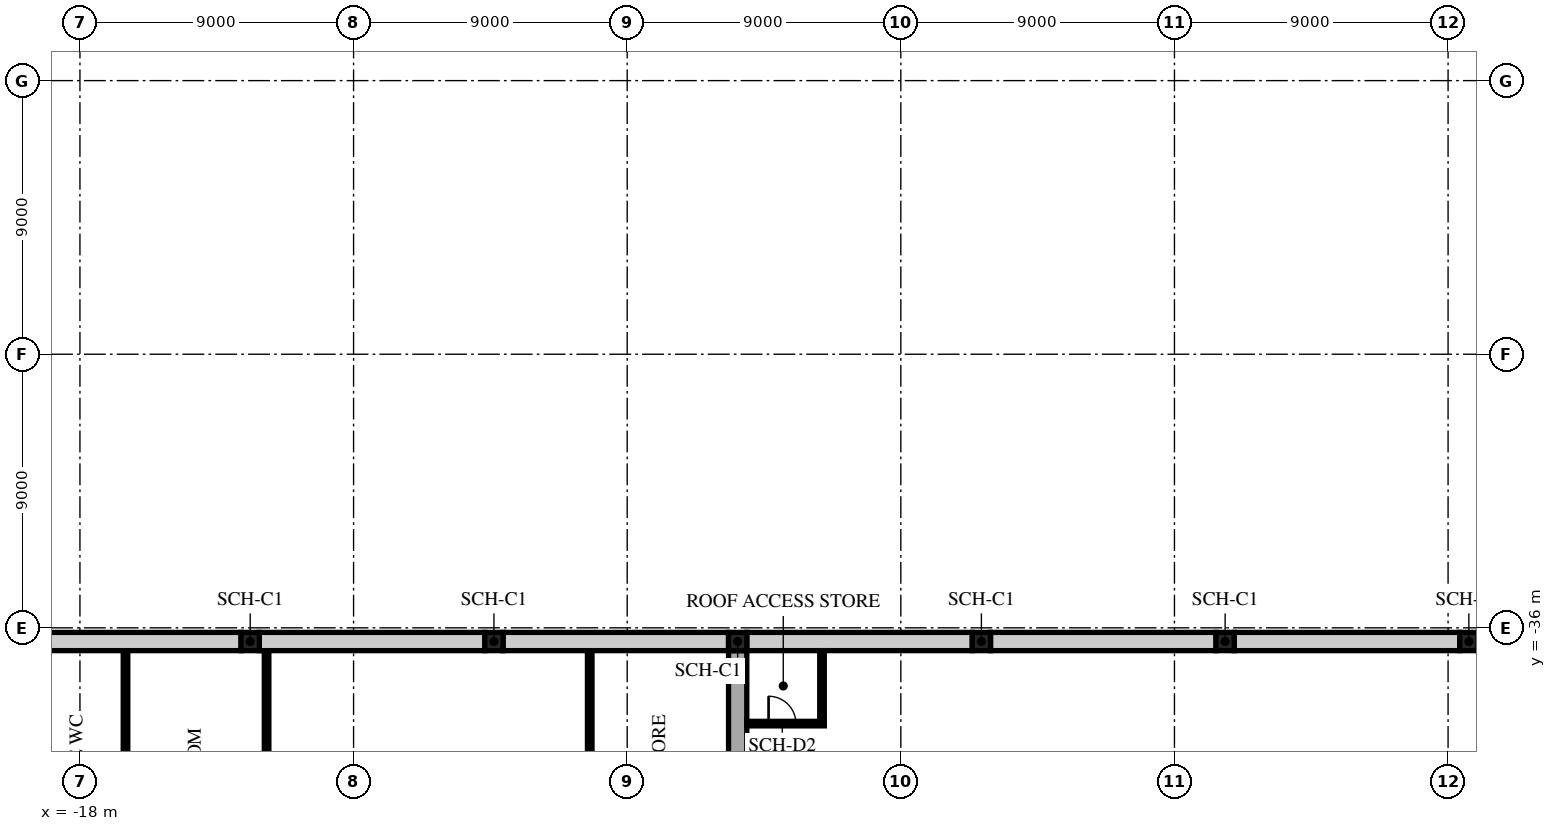
"""IFC4 building model, lengths in metres.
Left out: names, types, materials, properties, quantities, classifications, styles, units other than length and angle.
Written with IfcOpenShell. Run it as: python <this file> out.ifc"""

import sys

from ifc_helpers import new_model, si_unit, direction, frame, frame_2d, origin, origin_2d, place, context, subcontext, project, spatial, rectangle, extrude, element, fill, save


model = new_model("IFC4")
c1 = context("Model", 3, precision=1e-05, world=origin(), true_north=direction((0.0, 1.0)))
c2 = subcontext(c1, "Body", "Model", "MODEL_VIEW")
j1 = project(units=[si_unit("LENGTHUNIT", "METRE"), si_unit("PLANEANGLEUNIT", "RADIAN")], contexts=[c1])
p1 = place(None, origin())
s1 = spatial("IfcSite", under=j1, at=p1, CompositionType="ELEMENT")
p2 = place(p1, origin())
s2 = spatial("IfcBuilding", under=s1, at=p2, CompositionType="ELEMENT")
p3 = place(p2, origin())
s3 = spatial("IfcBuildingStorey", under=s2, at=p3, CompositionType="ELEMENT", Elevation=0.0)
p4 = place(p3, frame((-18.0, -34.6, 0.0), z_axis=(0.0, 0.0, 1.0), x_axis=(1.0, 0.0, 0.0)))
e1 = element("IfcColumn", 1, at=p4, inside=s3, PredefinedType="COLUMN", context=c2, shape_type="SweptSolid", body=[
    extrude(rectangle(XDim=0.7, YDim=0.7, at=origin_2d()), origin(), (0.0, 0.0, 1.0), 4.5),
])
p5 = place(p3, frame((-18.0, -27.0, 0.0), z_axis=(0.0, 0.0, 1.0), x_axis=(1.0, 0.0, 0.0)))
e2 = element("IfcColumn", 2, at=p5, inside=s3, PredefinedType="COLUMN", context=c2, shape_type="SweptSolid", body=[
    extrude(rectangle(XDim=0.85, YDim=0.85, at=origin_2d()), origin(), (0.0, 0.0, 1.0), 4.5),
])
p6 = place(p3, frame((-18.0, -18.0, 0.0), z_axis=(0.0, 0.0, 1.0), x_axis=(1.0, 0.0, 0.0)))
e3 = element("IfcColumn", 3, at=p6, inside=s3, PredefinedType="COLUMN", context=c2, shape_type="SweptSolid", body=[
    extrude(rectangle(XDim=0.875, YDim=0.875, at=origin_2d()), origin(), (0.0, 0.0, 1.0), 4.5),
])
p7 = place(p3, frame((-9.0, -34.6, 0.0), z_axis=(0.0, 0.0, 1.0), x_axis=(1.0, 0.0, 0.0)))
e4 = element("IfcColumn", 4, at=p7, inside=s3, PredefinedType="COLUMN", context=c2, shape_type="SweptSolid", body=[
    extrude(rectangle(XDim=0.725, YDim=0.725, at=origin_2d()), origin(), (0.0, 0.0, 1.0), 4.5),
])
p8 = place(p3, frame((-9.0, -18.0, 0.0), z_axis=(0.0, 0.0, 1.0), x_axis=(1.0, 0.0, 0.0)))
e5 = element("IfcColumn", 5, at=p8, inside=s3, PredefinedType="COLUMN", context=c2, shape_type="SweptSolid", body=[
    extrude(rectangle(XDim=0.825, YDim=0.825, at=origin_2d()), origin(), (0.0, 0.0, 1.0), 4.5),
])
p9 = place(p3, frame((0.0, -34.6, 0.0), z_axis=(0.0, 0.0, 1.0), x_axis=(1.0, 0.0, 0.0)))
e6 = element("IfcColumn", 6, at=p9, inside=s3, PredefinedType="COLUMN", context=c2, shape_type="SweptSolid", body=[
    extrude(rectangle(XDim=0.7, YDim=0.7, at=origin_2d()), origin(), (0.0, 0.0, 1.0), 4.5),
])
for number, where, z_axis, x_axis in (
    (7, (0.0, -27.0, 0.0), (0.0, 0.0, 1.0), (1.0, 0.0, 0.0)),
    (8, (0.0, -18.0, 0.0), (0.0, 0.0, 1.0), (1.0, 0.0, 0.0)),
):
    element("IfcColumn", number, at=place(p3, frame(where, z_axis=z_axis, x_axis=x_axis)), inside=s3, PredefinedType="COLUMN", context=c2, shape_type="SweptSolid", body=[
        extrude(rectangle(XDim=0.8, YDim=0.8, at=origin_2d()), origin(), (0.0, 0.0, 1.0), 4.5),
    ])
p10 = place(p3, frame((9.0, -34.6, 0.0), z_axis=(0.0, 0.0, 1.0), x_axis=(1.0, 0.0, 0.0)))
e9 = element("IfcColumn", 9, at=p10, inside=s3, PredefinedType="COLUMN", context=c2, shape_type="SweptSolid", body=[
    extrude(rectangle(XDim=0.675, YDim=0.675, at=origin_2d()), origin(), (0.0, 0.0, 1.0), 4.5),
])
p11 = place(p3, frame((9.0, -27.0, 0.0), z_axis=(0.0, 0.0, 1.0), x_axis=(1.0, 0.0, 0.0)))
e10 = element("IfcColumn", 10, at=p11, inside=s3, PredefinedType="COLUMN", context=c2, shape_type="SweptSolid", body=[
    extrude(rectangle(XDim=0.825, YDim=0.825, at=origin_2d()), origin(), (0.0, 0.0, 1.0), 4.5),
])
p12 = place(p3, frame((9.0, -18.0, 0.0), z_axis=(0.0, 0.0, 1.0), x_axis=(1.0, 0.0, 0.0)))
e11 = element("IfcColumn", 11, at=p12, inside=s3, PredefinedType="COLUMN", context=c2, shape_type="SweptSolid", body=[
    extrude(rectangle(XDim=0.775, YDim=0.775, at=origin_2d()), origin(), (0.0, 0.0, 1.0), 4.5),
])
p13 = place(p3, frame((18.0, -34.6, 0.0), z_axis=(0.0, 0.0, 1.0), x_axis=(1.0, 0.0, 0.0)))
e12 = element("IfcColumn", 12, at=p13, inside=s3, PredefinedType="COLUMN", context=c2, shape_type="SweptSolid", body=[
    extrude(rectangle(XDim=0.725, YDim=0.725, at=origin_2d()), origin(), (0.0, 0.0, 1.0), 4.5),
])
p14 = place(p3, frame((18.0, -18.0, 0.0), z_axis=(0.0, 0.0, 1.0), x_axis=(1.0, 0.0, 0.0)))
e13 = element("IfcColumn", 13, at=p14, inside=s3, PredefinedType="COLUMN", context=c2, shape_type="SweptSolid", body=[
    extrude(rectangle(XDim=0.875, YDim=0.875, at=origin_2d()), origin(), (0.0, 0.0, 1.0), 4.5),
])
p15 = place(p3, frame((27.0, -34.6, 0.0), z_axis=(0.0, 0.0, 1.0), x_axis=(1.0, 0.0, 0.0)))
e14 = element("IfcColumn", 14, at=p15, inside=s3, PredefinedType="COLUMN", context=c2, shape_type="SweptSolid", body=[
    extrude(rectangle(XDim=0.625, YDim=0.625, at=origin_2d()), origin(), (0.0, 0.0, 1.0), 4.5),
])
p16 = place(p3, frame((27.0, -27.0, 0.0), z_axis=(0.0, 0.0, 1.0), x_axis=(1.0, 0.0, 0.0)))
e15 = element("IfcColumn", 15, at=p16, inside=s3, PredefinedType="COLUMN", context=c2, shape_type="SweptSolid", body=[
    extrude(rectangle(XDim=0.875, YDim=0.875, at=origin_2d()), origin(), (0.0, 0.0, 1.0), 4.5),
])
p17 = place(p3, frame((27.0, -18.0, 0.0), z_axis=(0.0, 0.0, 1.0), x_axis=(1.0, 0.0, 0.0)))
e16 = element("IfcColumn", 16, at=p17, inside=s3, PredefinedType="COLUMN", context=c2, shape_type="SweptSolid", body=[
    extrude(rectangle(XDim=0.85, YDim=0.85, at=origin_2d()), origin(), (0.0, 0.0, 1.0), 4.5),
])
p18 = place(p3, frame((-9.945, -29.093, 0.0), z_axis=(0.0, 0.0, 1.0), x_axis=(0.991001197216, 0.133853005627, 0.0)))
e17 = element("IfcColumn", 17, at=p18, inside=s3, PredefinedType="COLUMN", context=c2, shape_type="SweptSolid", body=[
    extrude(rectangle(XDim=1.475, YDim=1.475, at=origin_2d()), origin(), (0.0, 0.0, 1.0), 4.5),
])
p19 = place(p3, frame((3.681, -27.253, 0.0), z_axis=(0.0, 0.0, 1.0), x_axis=(0.991001197216, 0.133853005627, 0.0)))
e18 = element("IfcColumn", 18, at=p19, inside=s3, PredefinedType="COLUMN", context=c2, shape_type="SweptSolid", body=[
    extrude(rectangle(XDim=1.6, YDim=1.6, at=origin_2d()), origin(), (0.0, 0.0, 1.0), 4.5),
])
p20 = place(p3, frame((17.307, -25.412, 0.0), z_axis=(0.0, 0.0, 1.0), x_axis=(0.991001197216, 0.133853005627, 0.0)))
e19 = element("IfcColumn", 19, at=p20, inside=s3, PredefinedType="COLUMN", context=c2, shape_type="SweptSolid", body=[
    extrude(rectangle(XDim=1.575, YDim=1.575, at=origin_2d()), origin(), (0.0, 0.0, 1.0), 4.5),
])
p21 = place(p3, frame((27.531, -20.979, 0.0), z_axis=(0.0, 0.0, 1.0), x_axis=(0.991001197216, 0.133853005627, 0.0)))
e20 = element("IfcColumn", 20, at=p21, inside=s3, PredefinedType="COLUMN", context=c2, shape_type="SweptSolid", body=[
    extrude(rectangle(XDim=2.3, YDim=2.3, at=origin_2d()), origin(), (0.0, 0.0, 1.0), 4.5),
])
p22 = place(p3, frame((17.925, -27.0, 0.0), z_axis=(0.0, 0.0, 1.0), x_axis=(1.0, 0.0, 0.0)))
e21 = element("IfcWall", 21, at=p22, inside=s3, PredefinedType="PARTITIONING", context=c2, shape_type="SweptSolid", body=[
    extrude(rectangle(XDim=8.575, YDim=0.15, at=frame_2d((4.288, 0.0))), origin(), (0.0, 0.0, 1.0), 4.1),
])
p23 = place(p22, frame((4.075, 0.0, 0.0)))
e22 = element("IfcOpeningElement", 22, at=p23, cuts=e21, PredefinedType="OPENING", context=c2, shape_type="SweptSolid", body=[
    extrude(rectangle(XDim=1.0, YDim=2.1, at=frame_2d((0.5, 1.05))), frame((0.0, 0.085, 0.0), z_axis=(0.0, -1.0, 0.0), x_axis=(1.0, 0.0, 0.0)), (0.0, 0.0, 1.0), 0.17),
])
p24 = place(p3, frame((27.5, -27.0, 0.0), z_axis=(0.0, 0.0, 1.0), x_axis=(1.0, 0.0, 0.0)))
e23 = element("IfcWall", 23, at=p24, inside=s3, PredefinedType="PARTITIONING", context=c2, shape_type="SweptSolid", body=[
    extrude(rectangle(XDim=6.6, YDim=0.1, at=frame_2d((3.3, 0.0))), origin(), (0.0, 0.0, 1.0), 4.1),
])
p25 = place(p3, frame((-24.681, -18.0, 0.0), z_axis=(0.0, 0.0, 1.0), x_axis=(1.0, 0.0, 0.0)))
e24 = element("IfcWall", 24, at=p25, inside=s3, PredefinedType="PARTITIONING", context=c2, shape_type="SweptSolid", body=[
    extrude(rectangle(XDim=6.181, YDim=0.15, at=frame_2d((3.09, 0.0))), origin(), (0.0, 0.0, 1.0), 4.1),
])
p26 = place(p3, frame((-17.5, -18.0, 0.0), z_axis=(0.0, 0.0, 1.0), x_axis=(1.0, 0.0, 0.0)))
e25 = element("IfcWall", 25, at=p26, inside=s3, PredefinedType="PARTITIONING", context=c2, shape_type="SweptSolid", body=[
    extrude(rectangle(XDim=8.0, YDim=0.15, at=frame_2d((4.0, 0.0))), origin(), (0.0, 0.0, 1.0), 4.1),
])
p27 = place(p26, frame((1.2, 0.0, 0.0)))
e26 = element("IfcOpeningElement", 26, at=p27, cuts=e25, PredefinedType="OPENING", context=c2, shape_type="SweptSolid", body=[
    extrude(rectangle(XDim=1.0, YDim=2.1, at=frame_2d((0.5, 1.05))), frame((0.0, 0.085, 0.0), z_axis=(0.0, -1.0, 0.0), x_axis=(1.0, 0.0, 0.0)), (0.0, 0.0, 1.0), 0.17),
])
p28 = place(p3, frame((-8.5, -18.0, 0.0), z_axis=(0.0, 0.0, 1.0), x_axis=(1.0, 0.0, 0.0)))
e27 = element("IfcWall", 27, at=p28, inside=s3, PredefinedType="PARTITIONING", context=c2, shape_type="SweptSolid", body=[
    extrude(rectangle(XDim=8.0, YDim=0.15, at=frame_2d((4.0, 0.0))), origin(), (0.0, 0.0, 1.0), 4.1),
])
p29 = place(p28, frame((5.2, 0.0, 0.0)))
e28 = element("IfcOpeningElement", 28, at=p29, cuts=e27, PredefinedType="OPENING", context=c2, shape_type="SweptSolid", body=[
    extrude(rectangle(XDim=2.4, YDim=2.1, at=frame_2d((1.2, 1.05))), frame((0.0, 0.085, 0.0), z_axis=(0.0, -1.0, 0.0), x_axis=(1.0, 0.0, 0.0)), (0.0, 0.0, 1.0), 0.17),
])
for number, where, z_axis, x_axis in (
    (29, (0.5, -18.0, 0.0), (0.0, 0.0, 1.0), (1.0, 0.0, 0.0)),
    (30, (9.5, -18.0, 0.0), (0.0, 0.0, 1.0), (1.0, 0.0, 0.0)),
):
    element("IfcWall", number, at=place(p3, frame(where, z_axis=z_axis, x_axis=x_axis)), inside=s3, PredefinedType="PARTITIONING", context=c2, shape_type="SweptSolid", body=[
        extrude(rectangle(XDim=8.0, YDim=0.15, at=frame_2d((4.0, 0.0))), origin(), (0.0, 0.0, 1.0), 4.1),
    ])
p30 = place(p3, frame((27.5, -18.0, 0.0), z_axis=(0.0, 0.0, 1.0), x_axis=(1.0, 0.0, 0.0)))
e31 = element("IfcWall", 31, at=p30, inside=s3, PredefinedType="PARTITIONING", context=c2, shape_type="SweptSolid", body=[
    extrude(rectangle(XDim=6.6, YDim=0.15, at=frame_2d((3.3, 0.0))), origin(), (0.0, 0.0, 1.0), 4.1),
])
p31 = place(p30, frame((3.5, 0.0, 0.0)))
e32 = element("IfcOpeningElement", 32, at=p31, cuts=e31, PredefinedType="OPENING", context=c2, shape_type="SweptSolid", body=[
    extrude(rectangle(XDim=1.0, YDim=2.1, at=frame_2d((0.5, 1.05))), frame((0.0, 0.085, 0.0), z_axis=(0.0, -1.0, 0.0), x_axis=(1.0, 0.0, 0.0)), (0.0, 0.0, 1.0), 0.17),
])
p32 = place(p3, frame((-18.0, -36.0, 0.0), z_axis=(0.0, 0.0, 1.0), x_axis=(0.0, 1.0, 0.0)))
e33 = element("IfcWall", 33, at=p32, inside=s3, PredefinedType="PARTITIONING", context=c2, shape_type="SweptSolid", body=[
    extrude(rectangle(XDim=0.9, YDim=0.1, at=frame_2d((0.45, 0.0))), origin(), (0.0, 0.0, 1.0), 4.1),
])
p33 = place(p3, frame((-18.0, -34.1, 0.0), z_axis=(0.0, 0.0, 1.0), x_axis=(0.0, 1.0, 0.0)))
e34 = element("IfcWall", 34, at=p33, inside=s3, PredefinedType="PARTITIONING", context=c2, shape_type="SweptSolid", body=[
    extrude(rectangle(XDim=6.6, YDim=0.1, at=frame_2d((3.3, 0.0))), origin(), (0.0, 0.0, 1.0), 4.1),
])
p34 = place(p3, frame((-18.0, -26.5, 0.0), z_axis=(0.0, 0.0, 1.0), x_axis=(0.0, 1.0, 0.0)))
e35 = element("IfcWall", 35, at=p34, inside=s3, PredefinedType="PARTITIONING", context=c2, shape_type="SweptSolid", body=[
    extrude(rectangle(XDim=8.0, YDim=0.1, at=frame_2d((4.0, 0.0))), origin(), (0.0, 0.0, 1.0), 4.1),
])
for number, where, z_axis, x_axis in (
    (36, (-13.5, -36.0, 0.0), (0.0, 0.0, 1.0), (0.0, 1.0, 0.0)),
    (37, (13.5, -36.0, 0.0), (0.0, 0.0, 1.0), (0.0, 1.0, 0.0)),
):
    element("IfcWall", number, at=place(p3, frame(where, z_axis=z_axis, x_axis=x_axis)), inside=s3, PredefinedType="PARTITIONING", context=c2, shape_type="SweptSolid", body=[
        extrude(rectangle(XDim=17.925, YDim=0.1, at=frame_2d((8.962, 0.0))), origin(), (0.0, 0.0, 1.0), 4.1),
    ])
p35 = place(p3, frame((18.0, -36.0, 0.0), z_axis=(0.0, 0.0, 1.0), x_axis=(0.0, 1.0, 0.0)))
e38 = element("IfcWall", 38, at=p35, inside=s3, PredefinedType="PARTITIONING", context=c2, shape_type="SweptSolid", body=[
    extrude(rectangle(XDim=0.9, YDim=0.1, at=frame_2d((0.45, 0.0))), origin(), (0.0, 0.0, 1.0), 4.1),
])
p36 = place(p3, frame((18.0, -34.1, 0.0), z_axis=(0.0, 0.0, 1.0), x_axis=(0.0, 1.0, 0.0)))
e39 = element("IfcWall", 39, at=p36, inside=s3, PredefinedType="PARTITIONING", context=c2, shape_type="SweptSolid", body=[
    extrude(rectangle(XDim=7.025, YDim=0.1, at=frame_2d((3.513, 0.0))), origin(), (0.0, 0.0, 1.0), 4.1),
])
p37 = place(p3, frame((18.0, -26.925, 0.0), z_axis=(0.0, 0.0, 1.0), x_axis=(0.0, 1.0, 0.0)))
e40 = element("IfcWall", 40, at=p37, inside=s3, PredefinedType="PARTITIONING", context=c2, shape_type="SweptSolid", body=[
    extrude(rectangle(XDim=0.782, YDim=0.15, at=frame_2d((0.391, 0.0))), origin(), (0.0, 0.0, 1.0), 4.1),
])
p38 = place(p3, frame((18.0, -24.681, 0.0), z_axis=(0.0, 0.0, 1.0), x_axis=(0.0, 1.0, 0.0)))
e41 = element("IfcWall", 41, at=p38, inside=s3, PredefinedType="PARTITIONING", context=c2, shape_type="SweptSolid", body=[
    extrude(rectangle(XDim=6.181, YDim=0.15, at=frame_2d((3.09, 0.0))), origin(), (0.0, 0.0, 1.0), 4.1),
])
p39 = place(p38, frame((1.681, 0.0, 0.0)))
e42 = element("IfcOpeningElement", 42, at=p39, cuts=e41, PredefinedType="OPENING", context=c2, shape_type="SweptSolid", body=[
    extrude(rectangle(XDim=1.0, YDim=2.1, at=frame_2d((0.5, 1.05))), frame((0.0, 0.085, 0.0), z_axis=(0.0, -1.0, 0.0), x_axis=(1.0, 0.0, 0.0)), (0.0, 0.0, 1.0), 0.17),
])
p40 = place(p3, frame((27.0, -26.5, 0.0), z_axis=(0.0, 0.0, 1.0), x_axis=(0.0, 1.0, 0.0)))
e43 = element("IfcWall", 43, at=p40, inside=s3, PredefinedType="PARTITIONING", context=c2, shape_type="SweptSolid", body=[
    extrude(rectangle(XDim=4.284, YDim=0.15, at=frame_2d((2.142, 0.0))), origin(), (0.0, 0.0, 1.0), 4.1),
])
p41 = place(p3, frame((27.0, -19.742, 0.0), z_axis=(0.0, 0.0, 1.0), x_axis=(0.0, 1.0, 0.0)))
e44 = element("IfcWall", 44, at=p41, inside=s3, PredefinedType="PARTITIONING", context=c2, shape_type="SweptSolid", body=[
    extrude(rectangle(XDim=1.242, YDim=0.15, at=frame_2d((0.621, 0.0))), origin(), (0.0, 0.0, 1.0), 4.1),
])
for number, where, z_axis, x_axis in (
    (45, (-12.4, -36.45, -0.2), (0.0, 0.0, 1.0), (1.0, 0.0, 0.0)),
    (46, (-4.383, -36.45, -0.2), (0.0, 0.0, 1.0), (1.0, 0.0, 0.0)),
    (47, (3.633, -36.45, -0.2), (0.0, 0.0, 1.0), (1.0, 0.0, 0.0)),
    (48, (11.65, -36.45, -0.2), (0.0, 0.0, 1.0), (1.0, 0.0, 0.0)),
    (49, (19.667, -36.45, -0.2), (0.0, 0.0, 1.0), (1.0, 0.0, 0.0)),
    (50, (27.683, -36.45, -0.2), (0.0, 0.0, 1.0), (1.0, 0.0, 0.0)),
):
    element("IfcColumn", number, at=place(p3, frame(where, z_axis=z_axis, x_axis=x_axis)), inside=s3, PredefinedType="COLUMN", context=c2, shape_type="SweptSolid", body=[
        extrude(rectangle(XDim=0.6, YDim=0.6, at=origin_2d()), origin(), (0.0, 0.0, 1.0), 4.7),
    ])
for number, where, z_axis, x_axis in (
    (51, (-16.502, -45.9, 0.0), (0.0, 0.0, 1.0), (0.0, 1.0, 0.0)),
    (52, (-11.861, -45.9, 0.0), (0.0, 0.0, 1.0), (0.0, 1.0, 0.0)),
    (53, (-1.233, -45.9, 0.0), (0.0, 0.0, 1.0), (0.0, 1.0, 0.0)),
):
    element("IfcWall", number, at=place(p3, frame(where, z_axis=z_axis, x_axis=x_axis)), inside=s3, PredefinedType="PARTITIONING", context=c2, shape_type="SweptSolid", body=[
        extrude(rectangle(XDim=9.15, YDim=0.15, at=frame_2d((4.575, 0.0))), origin(), (0.0, 0.0, 1.0), 4.1),
    ])
for number, where, z_axis, x_axis in (
    (54, (-20.117, -36.45, -0.2), (0.0, 0.0, 1.0), (1.0, 0.0, 0.0)),
    (55, (-12.1, -36.45, -0.2), (0.0, 0.0, 1.0), (1.0, 0.0, 0.0)),
):
    element("IfcWall", number, at=place(p3, frame(where, z_axis=z_axis, x_axis=x_axis)), inside=s3, PredefinedType="STANDARD", context=c2, shape_type="SweptSolid", body=[
        extrude(rectangle(XDim=7.417, YDim=0.6, at=frame_2d((3.708, 0.0))), origin(), (0.0, 0.0, 1.0), 4.3),
    ])
p42 = place(p3, frame((-4.083, -36.45, -0.2), z_axis=(0.0, 0.0, 1.0), x_axis=(1.0, 0.0, 0.0)))
e56 = element("IfcWall", 56, at=p42, inside=s3, PredefinedType="STANDARD", context=c2, shape_type="SweptSolid", body=[
    extrude(rectangle(XDim=7.417, YDim=0.6, at=frame_2d((3.708, 0.0))), origin(), (0.0, 0.0, 1.0), 4.3),
])
for number, where, z_axis, x_axis in (
    (57, (3.933, -36.45, -0.2), (0.0, 0.0, 1.0), (1.0, 0.0, 0.0)),
    (58, (11.95, -36.45, -0.2), (0.0, 0.0, 1.0), (1.0, 0.0, 0.0)),
):
    element("IfcWall", number, at=place(p3, frame(where, z_axis=z_axis, x_axis=x_axis)), inside=s3, PredefinedType="SOLIDWALL", context=c2, shape_type="SweptSolid", body=[
        extrude(rectangle(XDim=7.417, YDim=0.6, at=frame_2d((3.708, 0.0))), origin(), (0.0, 0.0, 1.0), 4.7),
    ])
p43 = place(p3, frame((19.967, -36.45, -0.2), z_axis=(0.0, 0.0, 1.0), x_axis=(1.0, 0.0, 0.0)))
e59 = element("IfcWall", 59, at=p43, inside=s3, PredefinedType="SOLIDWALL", context=c2, shape_type="SweptSolid", body=[
    extrude(rectangle(XDim=7.417, YDim=0.6, at=frame_2d((3.708, 0.0))), origin(), (0.0, 0.0, 1.0), 4.7),
])
p44 = place(p3, frame((3.633, -47.85, -0.2), z_axis=(0.0, 0.0, 1.0), x_axis=(0.0, 1.0, 0.0)))
e60 = element("IfcWall", 60, at=p44, inside=s3, PredefinedType="SOLIDWALL", context=c2, shape_type="SweptSolid", body=[
    extrude(rectangle(XDim=11.1, YDim=0.6, at=frame_2d((5.55, 0.0))), origin(), (0.0, 0.0, 1.0), 4.7),
])
p45 = place(p44, frame((0.15, 0.0, 0.2)))
e61 = element("IfcOpeningElement", 61, at=p45, cuts=e60, PredefinedType="OPENING", context=c2, shape_type="SweptSolid", body=[
    extrude(rectangle(XDim=1.5, YDim=2.4, at=frame_2d((0.75, 1.2))), frame((0.0, 0.31, 0.0), z_axis=(0.0, -1.0, 0.0), x_axis=(1.0, 0.0, 0.0)), (0.0, 0.0, 1.0), 0.62),
])
p46 = place(p3, frame((3.933, -39.15, 0.0), z_axis=(0.0, 0.0, 1.0), x_axis=(1.0, 0.0, 0.0)))
e62 = element("IfcWall", 62, at=p46, inside=s3, PredefinedType="SHEAR", context=c2, shape_type="SweptSolid", body=[
    extrude(rectangle(XDim=2.55, YDim=0.15, at=frame_2d((1.275, 0.0))), origin(), (0.0, 0.0, 1.0), 4.5),
])
p47 = place(p46, frame((0.717, 0.0, 0.0)))
e63 = element("IfcOpeningElement", 63, at=p47, cuts=e62, PredefinedType="OPENING", context=c2, shape_type="SweptSolid", body=[
    extrude(rectangle(XDim=0.9, YDim=2.1, at=frame_2d((0.45, 1.05))), frame((0.0, 0.085, 0.0), z_axis=(0.0, -1.0, 0.0), x_axis=(1.0, 0.0, 0.0)), (0.0, 0.0, 1.0), 0.17),
])
p48 = place(p3, frame((6.408, -39.15, 0.0), z_axis=(0.0, 0.0, 1.0), x_axis=(0.0, 1.0, 0.0)))
e64 = element("IfcWall", 64, at=p48, inside=s3, PredefinedType="SHEAR", context=c2, shape_type="SweptSolid", body=[
    extrude(rectangle(XDim=2.4, YDim=0.15, at=frame_2d((1.2, 0.0))), origin(), (0.0, 0.0, 1.0), 4.5),
])
p49 = place(p3, frame((-30.876, -35.7, 0.0), z_axis=(0.0, 0.0, 1.0), x_axis=(1.0, 0.0, 0.0)))
e65 = element("IfcWall", 65, at=p49, inside=s3, PredefinedType="STANDARD", context=c2, shape_type="SweptSolid", body=[
    extrude(rectangle(XDim=61.751, YDim=0.6, at=frame_2d((30.876, 0.0))), origin(), (0.0, 0.0, 1.0), 4.1),
])
p50 = place(p27, origin())
e66 = element("IfcDoor", 66, at=p50, inside=s3, OperationType="SINGLE_SWING_LEFT", PredefinedType="DOOR", context=c2, shape_type="SweptSolid", body=[
    extrude(rectangle(XDim=1.0, YDim=2.1, at=frame_2d((0.5, 1.05))), frame((0.0, 0.025, 0.0), z_axis=(0.0, -1.0, 0.0), x_axis=(1.0, 0.0, 0.0)), (0.0, 0.0, 1.0), 0.05),
])
fill(e26, e66)
p51 = place(p29, origin())
e67 = element("IfcDoor", 67, at=p51, inside=s3, OperationType="DOUBLE_DOOR_SINGLE_SWING", PredefinedType="DOOR", context=c2, shape_type="SweptSolid", body=[
    extrude(rectangle(XDim=2.4, YDim=2.1, at=frame_2d((1.2, 1.05))), frame((0.0, 0.025, 0.0), z_axis=(0.0, -1.0, 0.0), x_axis=(1.0, 0.0, 0.0)), (0.0, 0.0, 1.0), 0.05),
])
fill(e28, e67)
p52 = place(p39, origin())
e68 = element("IfcDoor", 68, at=p52, inside=s3, OperationType="SINGLE_SWING_RIGHT", PredefinedType="DOOR", context=c2, shape_type="SweptSolid", body=[
    extrude(rectangle(XDim=1.0, YDim=2.1, at=frame_2d((0.5, 1.05))), frame((0.0, 0.025, 0.0), z_axis=(0.0, -1.0, 0.0), x_axis=(1.0, 0.0, 0.0)), (0.0, 0.0, 1.0), 0.05),
])
fill(e42, e68)
p53 = place(p23, origin())
e69 = element("IfcDoor", 69, at=p53, inside=s3, OperationType="SINGLE_SWING_LEFT", PredefinedType="DOOR", context=c2, shape_type="SweptSolid", body=[
    extrude(rectangle(XDim=1.0, YDim=2.1, at=frame_2d((0.5, 1.05))), frame((0.0, 0.025, 0.0), z_axis=(0.0, -1.0, 0.0), x_axis=(1.0, 0.0, 0.0)), (0.0, 0.0, 1.0), 0.05),
])
fill(e22, e69)
p54 = place(p47, origin())
e70 = element("IfcDoor", 70, at=p54, inside=s3, OperationType="SINGLE_SWING_LEFT", PredefinedType="DOOR", context=c2, shape_type="SweptSolid", body=[
    extrude(rectangle(XDim=0.9, YDim=2.1, at=frame_2d((0.45, 1.05))), frame((0.0, 0.025, 0.0), z_axis=(0.0, -1.0, 0.0), x_axis=(1.0, 0.0, 0.0)), (0.0, 0.0, 1.0), 0.05),
])
fill(e63, e70)
save(model, sys.argv[1])
